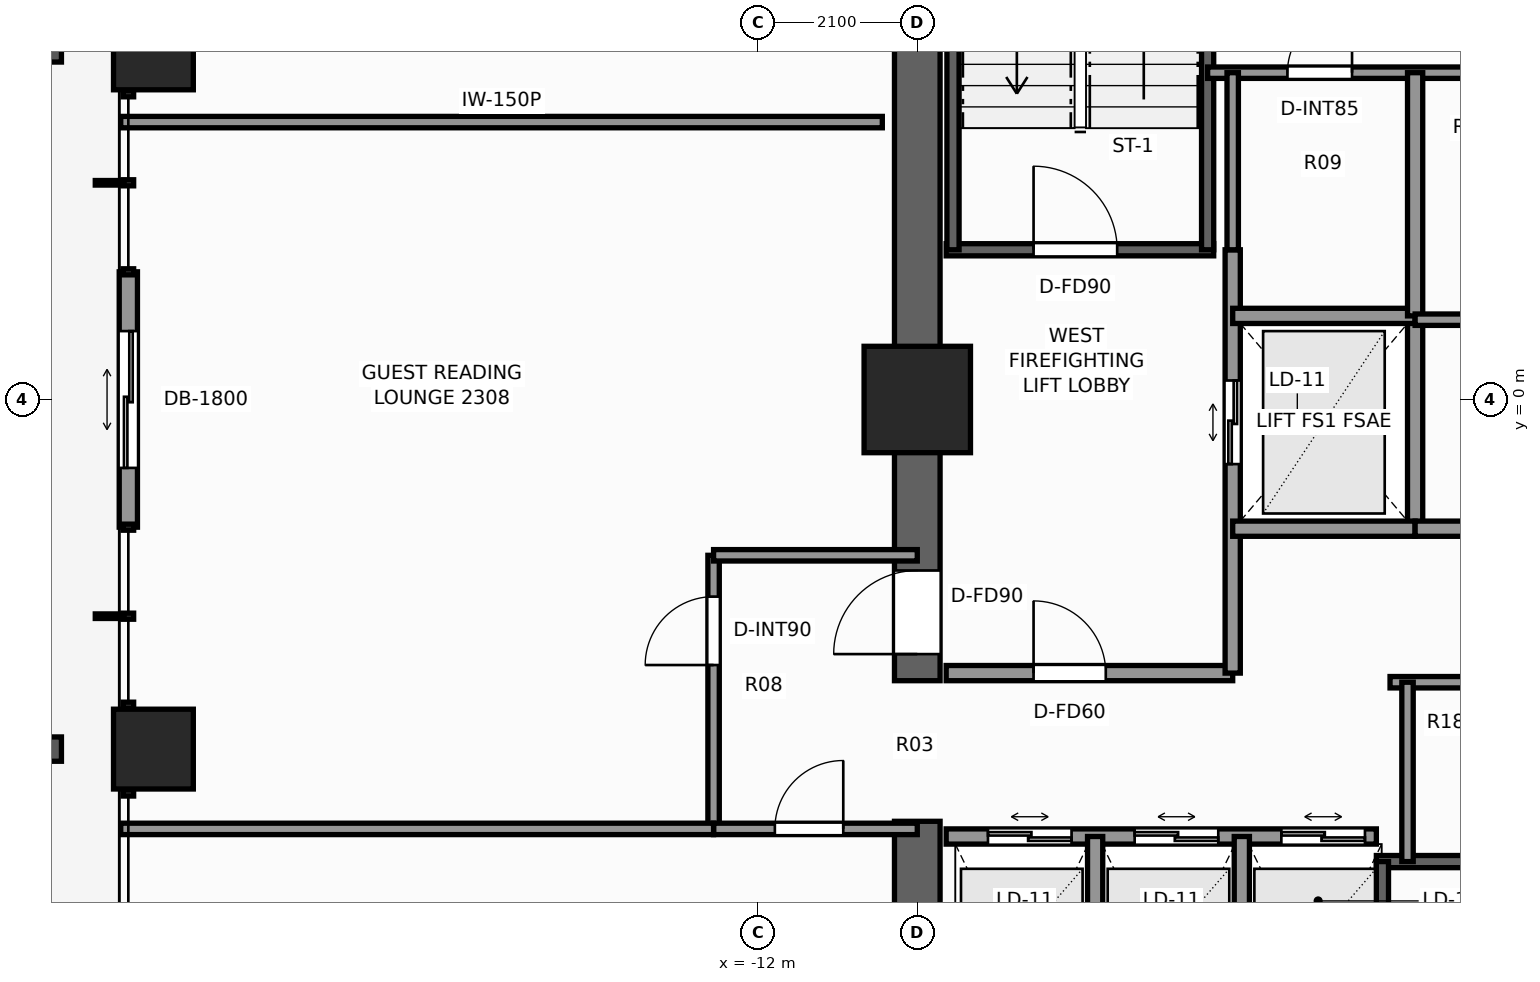
"""IFC4 building model, lengths in metres.
Left out: names, types, materials, properties, quantities, classifications, styles, units other than length and angle.
Written with IfcOpenShell. Run it as: python <this file> out.ifc"""

import sys

from ifc_helpers import new_model, si_unit, direction, frame, frame_2d, origin, origin_2d, place, context, subcontext, project, spatial, rectangle, extrude, element, fill, save


model = new_model("IFC4")
c1 = context("Model", 3, precision=1e-05, world=origin(), true_north=direction((0.0, 1.0)))
c2 = subcontext(c1, "Body", "Model", "MODEL_VIEW")
j1 = project(units=[si_unit("LENGTHUNIT", "METRE"), si_unit("PLANEANGLEUNIT", "RADIAN")], contexts=[c1])
p1 = place(None, origin())
s1 = spatial("IfcSite", under=j1, at=p1, CompositionType="ELEMENT")
p2 = place(p1, origin())
s2 = spatial("IfcBuilding", under=s1, at=p2, CompositionType="ELEMENT")
p3 = place(p2, frame((0.0, 0.0, 82.1)))
s3 = spatial("IfcBuildingStorey", under=s2, at=p3, CompositionType="ELEMENT", Elevation=82.1)
p4 = place(p3, frame((-9.9, -9.6, 0.0), z_axis=(0.0, 0.0, 1.0), x_axis=(0.0, 1.0, 0.0)))
e1 = element("IfcWall", 1, at=p4, inside=s3, PredefinedType="SHEAR", context=c2, shape_type="SweptSolid", body=[
    extrude(rectangle(XDim=4.05, YDim=0.6, at=frame_2d((2.025, 0.0))), origin(), (0.0, 0.0, 1.0), 3.3),
])
p5 = place(p3, frame((-9.9, -3.7, 0.0), z_axis=(0.0, 0.0, 1.0), x_axis=(0.0, 1.0, 0.0)))
e2 = element("IfcWall", 2, at=p5, inside=s3, PredefinedType="SHEAR", context=c2, shape_type="SweptSolid", body=[
    extrude(rectangle(XDim=13.3, YDim=0.6, at=frame_2d((6.65, 0.0))), origin(), (0.0, 0.0, 1.0), 3.3),
])
p6 = place(p5, frame((0.35, 0.0, 0.0)))
e3 = element("IfcOpeningElement", 3, at=p6, cuts=e2, PredefinedType="OPENING", context=c2, shape_type="SweptSolid", body=[
    extrude(rectangle(XDim=1.1, YDim=2.2, at=frame_2d((0.55, 1.1))), frame((0.0, 0.31, 0.0), z_axis=(0.0, -1.0, 0.0), x_axis=(1.0, 0.0, 0.0)), (0.0, 0.0, 1.0), 0.62),
])
p7 = place(p3, frame((-9.9, 0.0, 0.0), z_axis=(0.0, 0.0, 1.0), x_axis=(1.0, 0.0, 0.0)))
e4 = element("IfcColumn", 4, at=p7, inside=s3, PredefinedType="COLUMN", context=c2, shape_type="SweptSolid", body=[
    extrude(rectangle(XDim=1.4, YDim=1.4, at=origin_2d()), origin(), (0.0, 0.0, 1.0), 3.3),
])
for number, where, z_axis, x_axis in (
    (5, (-19.95, -4.6, 0.0), (0.0, 0.0, 1.0), (1.0, 0.0, 0.0)),
    (6, (-19.95, 4.6, 0.0), (0.0, 0.0, 1.0), (1.0, 0.0, 0.0)),
):
    element("IfcColumn", number, at=place(p3, frame(where, z_axis=z_axis, x_axis=x_axis)), inside=s3, PredefinedType="COLUMN", context=c2, shape_type="SweptSolid", body=[
        extrude(rectangle(XDim=1.05, YDim=1.05, at=origin_2d()), origin(), (0.0, 0.0, 1.0), 3.3),
    ])
p8 = place(p3, frame((-20.28, -1.68, 0.0), z_axis=(0.0, 0.0, 1.0), x_axis=(0.0, 1.0, 0.0)))
e7 = element("IfcWall", 7, at=p8, inside=s3, PredefinedType="STANDARD", context=c2, shape_type="SweptSolid", body=[
    extrude(rectangle(XDim=3.36, YDim=0.24, at=frame_2d((1.68, 0.0))), origin(), (0.0, 0.0, 1.0), 3.08),
])
p9 = place(p8, frame((0.78, 0.0, 0.0)))
e8 = element("IfcOpeningElement", 8, at=p9, cuts=e7, PredefinedType="OPENING", context=c2, shape_type="SweptSolid", body=[
    extrude(rectangle(XDim=1.8, YDim=2.2, at=frame_2d((0.9, 1.1))), frame((0.0, 0.13, 0.0), z_axis=(0.0, -1.0, 0.0), x_axis=(1.0, 0.0, 0.0)), (0.0, 0.0, 1.0), 0.26),
])
p10 = place(p3, frame((-9.52, 1.97, 0.0), z_axis=(0.0, 0.0, 1.0), x_axis=(1.0, 0.0, 0.0)))
e9 = element("IfcWall", 9, at=p10, inside=s3, PredefinedType="SHEAR", context=c2, shape_type="SweptSolid", body=[
    extrude(rectangle(XDim=3.52, YDim=0.16, at=frame_2d((1.76, 0.0))), origin(), (0.0, 0.0, 1.0), 3.3),
])
p11 = place(p10, frame((1.15, 0.0, 0.0)))
e10 = element("IfcOpeningElement", 10, at=p11, cuts=e9, PredefinedType="OPENING", context=c2, shape_type="SweptSolid", body=[
    extrude(rectangle(XDim=1.1, YDim=2.2, at=frame_2d((0.55, 1.1))), frame((0.0, 0.09, 0.0), z_axis=(0.0, -1.0, 0.0), x_axis=(1.0, 0.0, 0.0)), (0.0, 0.0, 1.0), 0.18),
])
for number, where, z_axis, x_axis in (
    (11, (-9.43, 1.97, 0.0), (0.0, 0.0, 1.0), (0.0, 1.0, 0.0)),
    (12, (-6.08, 1.97, 0.0), (0.0, 0.0, 1.0), (0.0, 1.0, 0.0)),
):
    element("IfcWall", number, at=place(p3, frame(where, z_axis=z_axis, x_axis=x_axis)), inside=s3, PredefinedType="SHEAR", context=c2, shape_type="SweptSolid", body=[
        extrude(rectangle(XDim=7.56, YDim=0.16, at=frame_2d((3.78, 0.0))), origin(), (0.0, 0.0, 1.0), 3.3),
    ])
p12 = place(p3, frame((-3.86, -6.08, 0.0), z_axis=(0.0, 0.0, 1.0), x_axis=(1.0, 0.0, 0.0)))
e13 = element("IfcWall", 13, at=p12, inside=s3, PredefinedType="SHEAR", context=c2, shape_type="SweptSolid", body=[
    extrude(rectangle(XDim=7.72, YDim=0.16, at=frame_2d((3.86, 0.0))), origin(), (0.0, 0.0, 1.0), 3.3),
])
p13 = place(p3, frame((-3.78, -9.43, 0.0), z_axis=(0.0, 0.0, 1.0), x_axis=(0.0, 1.0, 0.0)))
e14 = element("IfcWall", 14, at=p13, inside=s3, PredefinedType="SHEAR", context=c2, shape_type="SweptSolid", body=[
    extrude(rectangle(XDim=3.35, YDim=0.16, at=frame_2d((1.675, 0.0))), origin(), (0.0, 0.0, 1.0), 3.3),
])
p14 = place(p3, frame((-9.52, -3.6, 0.0), z_axis=(0.0, 0.0, 1.0), x_axis=(1.0, 0.0, 0.0)))
e15 = element("IfcWall", 15, at=p14, inside=s3, PredefinedType="SOLIDWALL", context=c2, shape_type="SweptSolid", body=[
    extrude(rectangle(XDim=3.77, YDim=0.2, at=frame_2d((1.885, 0.0))), origin(), (0.0, 0.0, 1.0), 3.08),
])
p15 = place(p14, frame((1.15, 0.0, 0.0)))
e16 = element("IfcOpeningElement", 16, at=p15, cuts=e15, PredefinedType="OPENING", context=c2, shape_type="SweptSolid", body=[
    extrude(rectangle(XDim=0.95, YDim=2.06, at=frame_2d((0.475, 1.03))), frame((0.0, 0.11, 0.0), z_axis=(0.0, -1.0, 0.0), x_axis=(1.0, 0.0, 0.0)), (0.0, 0.0, 1.0), 0.22),
])
p16 = place(p3, frame((-5.75, -3.6, 0.0), z_axis=(0.0, 0.0, 1.0), x_axis=(0.0, 1.0, 0.0)))
e17 = element("IfcWall", 17, at=p16, inside=s3, PredefinedType="SOLIDWALL", context=c2, shape_type="SweptSolid", body=[
    extrude(rectangle(XDim=5.57, YDim=0.2, at=frame_2d((2.785, 0.0))), origin(), (0.0, 0.0, 1.0), 3.08),
])
p17 = place(p16, frame((2.75, 0.0, 0.0)))
e18 = element("IfcOpeningElement", 18, at=p17, cuts=e17, PredefinedType="OPENING", context=c2, shape_type="SweptSolid", body=[
    extrude(rectangle(XDim=1.1, YDim=2.2, at=frame_2d((0.55, 1.1))), frame((0.0, 0.11, 0.0), z_axis=(0.0, -1.0, 0.0), x_axis=(1.0, 0.0, 0.0)), (0.0, 0.0, 1.0), 0.22),
])
p18 = place(p3, frame((-3.35, -1.7, 0.0), z_axis=(0.0, 0.0, 1.0), x_axis=(0.0, 1.0, 0.0)))
e19 = element("IfcWall", 19, at=p18, inside=s3, PredefinedType="SOLIDWALL", context=c2, shape_type="SweptSolid", body=[
    extrude(rectangle(XDim=2.8, YDim=0.2, at=frame_2d((1.4, 0.0))), origin(), (0.0, 0.0, 1.0), 3.08),
])
for number, where, z_axis, x_axis in (
    (20, (-5.75, -1.7, 0.0), (0.0, 0.0, 1.0), (1.0, 0.0, 0.0)),
    (21, (-5.75, 1.1, 0.0), (0.0, 0.0, 1.0), (1.0, 0.0, 0.0)),
):
    element("IfcWall", number, at=place(p3, frame(where, z_axis=z_axis, x_axis=x_axis)), inside=s3, PredefinedType="SOLIDWALL", context=c2, shape_type="SweptSolid", body=[
        extrude(rectangle(XDim=2.4, YDim=0.2, at=frame_2d((1.2, 0.0))), origin(), (0.0, 0.0, 1.0), 3.08),
    ])
p19 = place(p3, frame((-6.08, 4.3, 0.0), z_axis=(0.0, 0.0, 1.0), x_axis=(1.0, 0.0, 0.0)))
e22 = element("IfcWall", 22, at=p19, inside=s3, PredefinedType="PARTITIONING", context=c2, shape_type="SweptSolid", body=[
    extrude(rectangle(XDim=6.3, YDim=0.15, at=frame_2d((3.15, 0.0))), origin(), (0.0, 0.0, 1.0), 3.08),
])
p20 = place(p19, frame((1.05, 0.0, 0.0)))
e23 = element("IfcOpeningElement", 23, at=p20, cuts=e22, PredefinedType="OPENING", context=c2, shape_type="SweptSolid", body=[
    extrude(rectangle(XDim=0.85, YDim=2.03, at=frame_2d((0.425, 1.015))), frame((0.0, 0.085, 0.0), z_axis=(0.0, -1.0, 0.0), x_axis=(1.0, 0.0, 0.0)), (0.0, 0.0, 1.0), 0.17),
])
p21 = place(p3, frame((-9.52, -5.75, 0.0), z_axis=(0.0, 0.0, 1.0), x_axis=(1.0, 0.0, 0.0)))
e24 = element("IfcWall", 24, at=p21, inside=s3, PredefinedType="SOLIDWALL", context=c2, shape_type="SweptSolid", body=[
    extrude(rectangle(XDim=5.66, YDim=0.2, at=frame_2d((2.83, 0.0))), origin(), (0.0, 0.0, 1.0), 3.08),
])
p22 = place(p21, frame((0.55, 0.0, 0.0)))
e25 = element("IfcOpeningElement", 25, at=p22, cuts=e24, PredefinedType="OPENING", context=c2, shape_type="SweptSolid", body=[
    extrude(rectangle(XDim=1.1, YDim=2.2, at=frame_2d((0.55, 1.1))), frame((0.0, 0.11, 0.0), z_axis=(0.0, -1.0, 0.0), x_axis=(1.0, 0.0, 0.0)), (0.0, 0.0, 1.0), 0.22),
])
p23 = place(p21, frame((2.48, 0.0, 0.0)))
e26 = element("IfcOpeningElement", 26, at=p23, cuts=e24, PredefinedType="OPENING", context=c2, shape_type="SweptSolid", body=[
    extrude(rectangle(XDim=1.1, YDim=2.2, at=frame_2d((0.55, 1.1))), frame((0.0, 0.11, 0.0), z_axis=(0.0, -1.0, 0.0), x_axis=(1.0, 0.0, 0.0)), (0.0, 0.0, 1.0), 0.22),
])
p24 = place(p21, frame((4.41, 0.0, 0.0)))
e27 = element("IfcOpeningElement", 27, at=p24, cuts=e24, PredefinedType="OPENING", context=c2, shape_type="SweptSolid", body=[
    extrude(rectangle(XDim=1.1, YDim=2.2, at=frame_2d((0.55, 1.1))), frame((0.0, 0.11, 0.0), z_axis=(0.0, -1.0, 0.0), x_axis=(1.0, 0.0, 0.0)), (0.0, 0.0, 1.0), 0.22),
])
for number, where, z_axis, x_axis in (
    (28, (-7.56, -9.52, 0.0), (0.0, 0.0, 1.0), (0.0, 1.0, 0.0)),
    (29, (-5.63, -9.52, 0.0), (0.0, 0.0, 1.0), (0.0, 1.0, 0.0)),
):
    element("IfcWall", number, at=place(p3, frame(where, z_axis=z_axis, x_axis=x_axis)), inside=s3, PredefinedType="SOLIDWALL", context=c2, shape_type="SweptSolid", body=[
        extrude(rectangle(XDim=3.77, YDim=0.2, at=frame_2d((1.885, 0.0))), origin(), (0.0, 0.0, 1.0), 3.08),
    ])
p25 = place(p3, frame((-3.35, -1.7, 0.0), z_axis=(0.0, 0.0, 1.0), x_axis=(1.0, 0.0, 0.0)))
e30 = element("IfcWall", 30, at=p25, inside=s3, PredefinedType="SOLIDWALL", context=c2, shape_type="SweptSolid", body=[
    extrude(rectangle(XDim=6.7, YDim=0.2, at=frame_2d((3.35, 0.0))), origin(), (0.0, 0.0, 1.0), 3.08),
])
p26 = place(p3, frame((-3.35, 1.1, 0.0), z_axis=(0.0, 0.0, 1.0), x_axis=(0.0, 1.0, 0.0)))
e31 = element("IfcWall", 31, at=p26, inside=s3, PredefinedType="SOLIDWALL", context=c2, shape_type="SweptSolid", body=[
    extrude(rectangle(XDim=3.2, YDim=0.2, at=frame_2d((1.6, 0.0))), origin(), (0.0, 0.0, 1.0), 3.08),
])
p27 = place(p3, frame((-3.35, 1.05, 0.0), z_axis=(0.0, 0.0, 1.0), x_axis=(1.0, 0.0, 0.0)))
e32 = element("IfcWall", 32, at=p27, inside=s3, PredefinedType="PARTITIONING", context=c2, shape_type="SweptSolid", body=[
    extrude(rectangle(XDim=6.7, YDim=0.15, at=frame_2d((3.35, 0.0))), origin(), (0.0, 0.0, 1.0), 3.08),
])
p28 = place(p27, frame((4.2, 0.0, 0.0)))
e33 = element("IfcOpeningElement", 33, at=p28, cuts=e32, PredefinedType="OPENING", context=c2, shape_type="SweptSolid", body=[
    extrude(rectangle(XDim=0.85, YDim=2.03, at=frame_2d((0.425, 1.015))), frame((0.0, 0.085, 0.0), z_axis=(0.0, -1.0, 0.0), x_axis=(1.0, 0.0, 0.0)), (0.0, 0.0, 1.0), 0.17),
])
p29 = place(p3, frame((-3.68, -3.72, 0.0), z_axis=(0.0, 0.0, 1.0), x_axis=(1.0, 0.0, 0.0)))
e34 = element("IfcWall", 34, at=p29, inside=s3, PredefinedType="PARTITIONING", context=c2, shape_type="SweptSolid", body=[
    extrude(rectangle(XDim=7.36, YDim=0.15, at=frame_2d((3.68, 0.0))), origin(), (0.0, 0.0, 1.0), 3.08),
])
p30 = place(p3, frame((-3.45, -6.08, 0.0), z_axis=(0.0, 0.0, 1.0), x_axis=(0.0, 1.0, 0.0)))
e35 = element("IfcWall", 35, at=p30, inside=s3, PredefinedType="PARTITIONING", context=c2, shape_type="SweptSolid", body=[
    extrude(rectangle(XDim=2.36, YDim=0.15, at=frame_2d((1.18, 0.0))), origin(), (0.0, 0.0, 1.0), 3.08),
])
p31 = place(p3, frame((-5.75, 1.97, 0.0), z_axis=(0.0, 0.0, 1.0), x_axis=(0.0, 1.0, 0.0)))
e36 = element("IfcWall", 36, at=p31, inside=s3, PredefinedType="PARTITIONING", context=c2, shape_type="SweptSolid", body=[
    extrude(rectangle(XDim=2.33, YDim=0.15, at=frame_2d((1.165, 0.0))), origin(), (0.0, 0.0, 1.0), 3.08),
])
p32 = place(p3, frame((-12.58, -5.65, 0.0), z_axis=(0.0, 0.0, 1.0), x_axis=(0.0, 1.0, 0.0)))
e37 = element("IfcWall", 37, at=p32, inside=s3, PredefinedType="PARTITIONING", context=c2, shape_type="SweptSolid", body=[
    extrude(rectangle(XDim=3.6, YDim=0.15, at=frame_2d((1.8, 0.0))), origin(), (0.0, 0.0, 1.0), 2.292),
])
p33 = place(p32, frame((2.156, 0.0, 0.0)))
e38 = element("IfcOpeningElement", 38, at=p33, cuts=e37, PredefinedType="OPENING", context=c2, shape_type="SweptSolid", body=[
    extrude(rectangle(XDim=0.9, YDim=2.06, at=frame_2d((0.45, 1.03))), frame((0.0, 0.085, 0.0), z_axis=(0.0, -1.0, 0.0), x_axis=(1.0, 0.0, 0.0)), (0.0, 0.0, 1.0), 0.17),
])
p34 = place(p3, frame((-12.58, -2.05, 0.0), z_axis=(0.0, 0.0, 1.0), x_axis=(1.0, 0.0, 0.0)))
e39 = element("IfcWall", 39, at=p34, inside=s3, PredefinedType="PARTITIONING", context=c2, shape_type="SweptSolid", body=[
    extrude(rectangle(XDim=2.68, YDim=0.15, at=frame_2d((1.34, 0.0))), origin(), (0.0, 0.0, 1.0), 3.08),
])
p35 = place(p3, frame((-12.58, -5.65, 0.0), z_axis=(0.0, 0.0, 1.0), x_axis=(1.0, 0.0, 0.0)))
e40 = element("IfcWall", 40, at=p35, inside=s3, PredefinedType="PARTITIONING", context=c2, shape_type="SweptSolid", body=[
    extrude(rectangle(XDim=2.68, YDim=0.15, at=frame_2d((1.34, 0.0))), origin(), (0.0, 0.0, 1.0), 3.08),
])
p36 = place(p35, frame((0.806, 0.0, 0.0)))
e41 = element("IfcOpeningElement", 41, at=p36, cuts=e40, PredefinedType="OPENING", context=c2, shape_type="SweptSolid", body=[
    extrude(rectangle(XDim=0.9, YDim=2.06, at=frame_2d((0.45, 1.03))), frame((0.0, 0.085, 0.0), z_axis=(0.0, -1.0, 0.0), x_axis=(1.0, 0.0, 0.0)), (0.0, 0.0, 1.0), 0.17),
])
p37 = place(p3, frame((-20.38, 3.65, 0.0), z_axis=(0.0, 0.0, 1.0), x_axis=(1.0, 0.0, 0.0)))
e42 = element("IfcWall", 42, at=p37, inside=s3, PredefinedType="PARTITIONING", context=c2, shape_type="SweptSolid", body=[
    extrude(rectangle(XDim=10.02, YDim=0.15, at=frame_2d((5.01, 0.0))), origin(), (0.0, 0.0, 1.0), 2.449),
])
p38 = place(p3, frame((-20.38, -5.65, 0.0), z_axis=(0.0, 0.0, 1.0), x_axis=(1.0, 0.0, 0.0)))
e43 = element("IfcWall", 43, at=p38, inside=s3, PredefinedType="PARTITIONING", context=c2, shape_type="SweptSolid", body=[
    extrude(rectangle(XDim=7.8, YDim=0.15, at=frame_2d((3.9, 0.0))), origin(), (0.0, 0.0, 1.0), 2.449),
])
p39 = place(p9, origin())
e44 = element("IfcDoor", 44, at=p39, inside=s3, OperationType="DOUBLE_DOOR_SLIDING", PredefinedType="DOOR", context=c2, shape_type="SweptSolid", body=[
    extrude(rectangle(XDim=1.8, YDim=2.2, at=frame_2d((0.9, 1.1))), frame((0.0, 0.025, 0.0), z_axis=(0.0, -1.0, 0.0), x_axis=(1.0, 0.0, 0.0)), (0.0, 0.0, 1.0), 0.05),
])
fill(e8, e44)
p40 = place(p11, origin())
e45 = element("IfcDoor", 45, at=p40, inside=s3, OperationType="SINGLE_SWING_LEFT", PredefinedType="DOOR", context=c2, shape_type="SweptSolid", body=[
    extrude(rectangle(XDim=1.1, YDim=2.2, at=frame_2d((0.55, 1.1))), frame((0.0, 0.025, 0.0), z_axis=(0.0, -1.0, 0.0), x_axis=(1.0, 0.0, 0.0)), (0.0, 0.0, 1.0), 0.05),
])
fill(e10, e45)
p41 = place(p6, origin())
e46 = element("IfcDoor", 46, at=p41, inside=s3, OperationType="SINGLE_SWING_LEFT", PredefinedType="DOOR", context=c2, shape_type="SweptSolid", body=[
    extrude(rectangle(XDim=1.1, YDim=2.2, at=frame_2d((0.55, 1.1))), frame((0.0, 0.025, 0.0), z_axis=(0.0, -1.0, 0.0), x_axis=(1.0, 0.0, 0.0)), (0.0, 0.0, 1.0), 0.05),
])
fill(e3, e46)
p42 = place(p17, origin())
e47 = element("IfcDoor", 47, at=p42, inside=s3, OperationType="DOUBLE_DOOR_SLIDING", PredefinedType="DOOR", context=c2, shape_type="SweptSolid", body=[
    extrude(rectangle(XDim=1.1, YDim=2.2, at=frame_2d((0.55, 1.1))), frame((0.0, 0.025, 0.0), z_axis=(0.0, -1.0, 0.0), x_axis=(1.0, 0.0, 0.0)), (0.0, 0.0, 1.0), 0.05),
])
fill(e18, e47)
p43 = place(p22, origin())
e48 = element("IfcDoor", 48, at=p43, inside=s3, OperationType="DOUBLE_DOOR_SLIDING", PredefinedType="DOOR", context=c2, shape_type="SweptSolid", body=[
    extrude(rectangle(XDim=1.1, YDim=2.2, at=frame_2d((0.55, 1.1))), frame((0.0, 0.025, 0.0), z_axis=(0.0, -1.0, 0.0), x_axis=(1.0, 0.0, 0.0)), (0.0, 0.0, 1.0), 0.05),
])
fill(e25, e48)
p44 = place(p23, origin())
e49 = element("IfcDoor", 49, at=p44, inside=s3, OperationType="DOUBLE_DOOR_SLIDING", PredefinedType="DOOR", context=c2, shape_type="SweptSolid", body=[
    extrude(rectangle(XDim=1.1, YDim=2.2, at=frame_2d((0.55, 1.1))), frame((0.0, 0.025, 0.0), z_axis=(0.0, -1.0, 0.0), x_axis=(1.0, 0.0, 0.0)), (0.0, 0.0, 1.0), 0.05),
])
fill(e26, e49)
p45 = place(p24, origin())
e50 = element("IfcDoor", 50, at=p45, inside=s3, OperationType="DOUBLE_DOOR_SLIDING", PredefinedType="DOOR", context=c2, shape_type="SweptSolid", body=[
    extrude(rectangle(XDim=1.1, YDim=2.2, at=frame_2d((0.55, 1.1))), frame((0.0, 0.025, 0.0), z_axis=(0.0, -1.0, 0.0), x_axis=(1.0, 0.0, 0.0)), (0.0, 0.0, 1.0), 0.05),
])
fill(e27, e50)
p46 = place(p15, origin())
e51 = element("IfcDoor", 51, at=p46, inside=s3, OperationType="SINGLE_SWING_LEFT", PredefinedType="DOOR", context=c2, shape_type="SweptSolid", body=[
    extrude(rectangle(XDim=0.95, YDim=2.06, at=frame_2d((0.475, 1.03))), frame((0.0, 0.025, 0.0), z_axis=(0.0, -1.0, 0.0), x_axis=(1.0, 0.0, 0.0)), (0.0, 0.0, 1.0), 0.05),
])
fill(e16, e51)
p47 = place(p20, origin())
e52 = element("IfcDoor", 52, at=p47, inside=s3, OperationType="SINGLE_SWING_RIGHT", PredefinedType="DOOR", context=c2, shape_type="SweptSolid", body=[
    extrude(rectangle(XDim=0.85, YDim=2.03, at=frame_2d((0.425, 1.015))), frame((0.0, 0.025, 0.0), z_axis=(0.0, -1.0, 0.0), x_axis=(1.0, 0.0, 0.0)), (0.0, 0.0, 1.0), 0.05),
])
fill(e23, e52)
p48 = place(p33, origin())
e53 = element("IfcDoor", 53, at=p48, inside=s3, OperationType="SINGLE_SWING_LEFT", PredefinedType="DOOR", context=c2, shape_type="SweptSolid", body=[
    extrude(rectangle(XDim=0.9, YDim=2.06, at=frame_2d((0.45, 1.03))), frame((0.0, 0.025, 0.0), z_axis=(0.0, -1.0, 0.0), x_axis=(1.0, 0.0, 0.0)), (0.0, 0.0, 1.0), 0.05),
])
fill(e38, e53)
p49 = place(p36, origin())
e54 = element("IfcDoor", 54, at=p49, inside=s3, OperationType="SINGLE_SWING_RIGHT", PredefinedType="DOOR", context=c2, shape_type="SweptSolid", body=[
    extrude(rectangle(XDim=0.9, YDim=2.06, at=frame_2d((0.45, 1.03))), frame((0.0, 0.025, 0.0), z_axis=(0.0, -1.0, 0.0), x_axis=(1.0, 0.0, 0.0)), (0.0, 0.0, 1.0), 0.05),
])
fill(e41, e54)
save(model, sys.argv[1])
